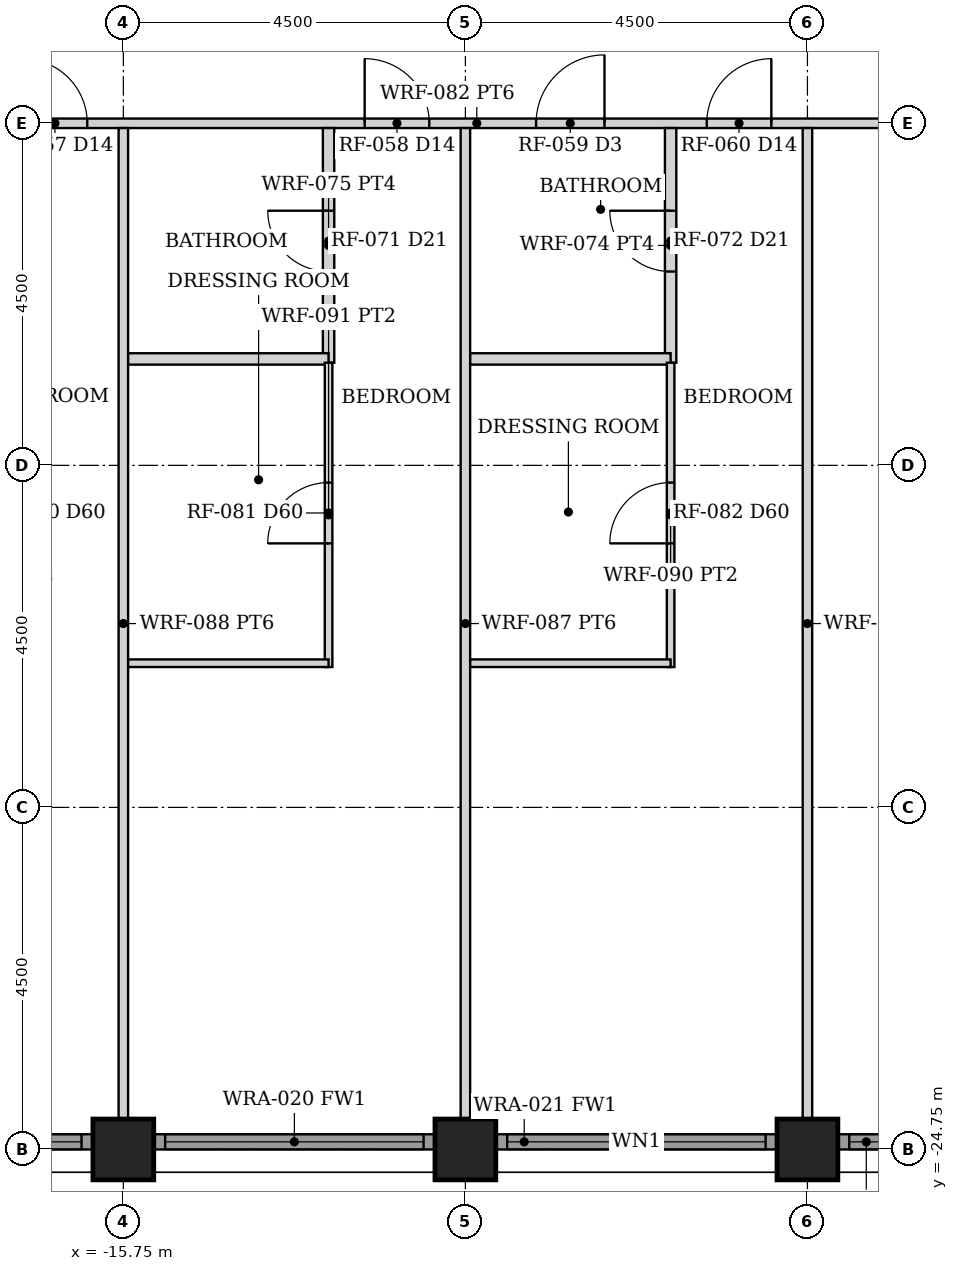
"""IFC4 building model, lengths in metres.
Left out: names, types, materials, properties, quantities, classifications, styles, units other than length and angle.
Written with IfcOpenShell. Run it as: python <this file> out.ifc"""

import sys

from ifc_helpers import new_model, si_unit, direction, frame, frame_2d, origin, origin_2d, place, context, subcontext, project, spatial, rectangle, hollow_rectangle, extrude, element, fill, save


model = new_model("IFC4")
c1 = context("Model", 3, precision=1e-05, world=origin(), true_north=direction((0.0, 1.0)))
c2 = subcontext(c1, "Body", "Model", "MODEL_VIEW")
j1 = project(units=[si_unit("LENGTHUNIT", "METRE"), si_unit("PLANEANGLEUNIT", "RADIAN")], contexts=[c1])
p1 = place(None, origin())
s1 = spatial("IfcSite", under=j1, at=p1, CompositionType="ELEMENT")
p2 = place(p1, origin())
s2 = spatial("IfcBuilding", under=s1, at=p2, CompositionType="ELEMENT")
p3 = place(p2, frame((0.0, 0.0, 79.0)))
s3 = spatial("IfcBuildingStorey", under=s2, at=p3, CompositionType="ELEMENT", Elevation=79.0)
for number, where, z_axis, x_axis in (
    (1, (-15.75, -24.75, 0.0), (0.0, 0.0, 1.0), (0.0, 1.0, 0.0)),
    (2, (-11.25, -24.75, 0.0), (0.0, 0.0, 1.0), (0.0, 1.0, 0.0)),
    (3, (-6.75, -24.75, 0.0), (0.0, 0.0, 1.0), (0.0, 1.0, 0.0)),
):
    element("IfcColumn", number, at=place(p3, frame(where, z_axis=z_axis, x_axis=x_axis)), inside=s3, PredefinedType="COLUMN", context=c2, shape_type="SweptSolid", body=[
        extrude(hollow_rectangle(XDim=0.8, YDim=0.8, WallThickness=0.06, at=origin_2d()), origin(), (0.0, 0.0, 1.0), 3.5),
    ])
p4 = place(p3, frame((-19.845, -24.65, 0.0), z_axis=(0.0, 0.0, 1.0), x_axis=(1.0, 0.0, 0.0)))
e4 = element("IfcWall", 4, at=p4, inside=s3, PredefinedType="SOLIDWALL", context=c2, shape_type="SweptSolid", body=[
    extrude(rectangle(XDim=3.69, YDim=0.2, at=frame_2d((1.845, 0.0))), origin(), (0.0, 0.0, 1.0), 2.379),
])
p5 = place(p4, frame((0.145, 0.0, 0.3)))
e5 = element("IfcOpeningElement", 5, at=p5, cuts=e4, PredefinedType="OPENING", context=c2, shape_type="SweptSolid", body=[
    extrude(rectangle(XDim=3.4, YDim=1.929, at=frame_2d((1.7, 0.964))), frame((0.0, 0.11, 0.0), z_axis=(0.0, -1.0, 0.0), x_axis=(1.0, 0.0, 0.0)), (0.0, 0.0, 1.0), 0.22),
])
p6 = place(p3, frame((-15.345, -24.65, 0.0), z_axis=(0.0, 0.0, 1.0), x_axis=(1.0, 0.0, 0.0)))
e6 = element("IfcWall", 6, at=p6, inside=s3, PredefinedType="SOLIDWALL", context=c2, shape_type="SweptSolid", body=[
    extrude(rectangle(XDim=3.69, YDim=0.2, at=frame_2d((1.845, 0.0))), origin(), (0.0, 0.0, 1.0), 2.379),
])
p7 = place(p6, frame((0.145, 0.0, 0.3)))
e7 = element("IfcOpeningElement", 7, at=p7, cuts=e6, PredefinedType="OPENING", context=c2, shape_type="SweptSolid", body=[
    extrude(rectangle(XDim=3.4, YDim=1.929, at=frame_2d((1.7, 0.964))), frame((0.0, 0.11, 0.0), z_axis=(0.0, -1.0, 0.0), x_axis=(1.0, 0.0, 0.0)), (0.0, 0.0, 1.0), 0.22),
])
p8 = place(p3, frame((-10.845, -24.65, 0.0), z_axis=(0.0, 0.0, 1.0), x_axis=(1.0, 0.0, 0.0)))
e8 = element("IfcWall", 8, at=p8, inside=s3, PredefinedType="SOLIDWALL", context=c2, shape_type="SweptSolid", body=[
    extrude(rectangle(XDim=3.69, YDim=0.2, at=frame_2d((1.845, 0.0))), origin(), (0.0, 0.0, 1.0), 2.379),
])
p9 = place(p8, frame((0.145, 0.0, 0.3)))
e9 = element("IfcOpeningElement", 9, at=p9, cuts=e8, PredefinedType="OPENING", context=c2, shape_type="SweptSolid", body=[
    extrude(rectangle(XDim=3.4, YDim=1.929, at=frame_2d((1.7, 0.964))), frame((0.0, 0.11, 0.0), z_axis=(0.0, -1.0, 0.0), x_axis=(1.0, 0.0, 0.0)), (0.0, 0.0, 1.0), 0.22),
])
p10 = place(p3, frame((-6.345, -24.65, 0.0), z_axis=(0.0, 0.0, 1.0), x_axis=(1.0, 0.0, 0.0)))
e10 = element("IfcWall", 10, at=p10, inside=s3, PredefinedType="SOLIDWALL", context=c2, shape_type="SweptSolid", body=[
    extrude(rectangle(XDim=3.69, YDim=0.2, at=frame_2d((1.845, 0.0))), origin(), (0.0, 0.0, 1.0), 2.379),
])
p11 = place(p10, frame((0.145, 0.0, 0.3)))
e11 = element("IfcOpeningElement", 11, at=p11, cuts=e10, PredefinedType="OPENING", context=c2, shape_type="SweptSolid", body=[
    extrude(rectangle(XDim=3.4, YDim=1.929, at=frame_2d((1.7, 0.964))), frame((0.0, 0.11, 0.0), z_axis=(0.0, -1.0, 0.0), x_axis=(1.0, 0.0, 0.0)), (0.0, 0.0, 1.0), 0.22),
])
p12 = place(p3, frame((-24.35, -11.25, 0.0), z_axis=(0.0, 0.0, 1.0), x_axis=(1.0, 0.0, 0.0)))
e12 = element("IfcWall", 12, at=p12, inside=s3, PredefinedType="PARTITIONING", context=c2, shape_type="SweptSolid", body=[
    extrude(rectangle(XDim=26.5, YDim=0.125, at=frame_2d((13.25, 0.0))), origin(), (0.0, 0.0, 1.0), 2.373),
])
p13 = place(p12, frame((24.75, 0.0, 0.0)))
e13 = element("IfcOpeningElement", 13, at=p13, cuts=e12, PredefinedType="OPENING", context=c2, shape_type="SweptSolid", body=[
    extrude(rectangle(XDim=0.9, YDim=2.1, at=frame_2d((0.45, 1.05))), frame((0.0, 0.073, 0.0), z_axis=(0.0, -1.0, 0.0), x_axis=(1.0, 0.0, 0.0)), (0.0, 0.0, 1.0), 0.145),
])
p14 = place(p12, frame((19.15, 0.0, 0.0)))
e14 = element("IfcOpeningElement", 14, at=p14, cuts=e12, PredefinedType="OPENING", context=c2, shape_type="SweptSolid", body=[
    extrude(rectangle(XDim=1.4, YDim=2.1, at=frame_2d((0.7, 1.05))), frame((0.0, 0.073, 0.0), z_axis=(0.0, -1.0, 0.0), x_axis=(1.0, 0.0, 0.0)), (0.0, 0.0, 1.0), 0.145),
])
p15 = place(p12, frame((16.275, 0.0, 0.0)))
e15 = element("IfcOpeningElement", 15, at=p15, cuts=e12, PredefinedType="OPENING", context=c2, shape_type="SweptSolid", body=[
    extrude(rectangle(XDim=0.85, YDim=2.1, at=frame_2d((0.425, 1.05))), frame((0.0, 0.073, 0.0), z_axis=(0.0, -1.0, 0.0), x_axis=(1.0, 0.0, 0.0)), (0.0, 0.0, 1.0), 0.145),
])
p16 = place(p12, frame((14.03, 0.0, 0.0)))
e16 = element("IfcOpeningElement", 16, at=p16, cuts=e12, PredefinedType="OPENING", context=c2, shape_type="SweptSolid", body=[
    extrude(rectangle(XDim=0.9, YDim=2.1, at=frame_2d((0.45, 1.05))), frame((0.0, 0.073, 0.0), z_axis=(0.0, -1.0, 0.0), x_axis=(1.0, 0.0, 0.0)), (0.0, 0.0, 1.0), 0.145),
])
p17 = place(p12, frame((11.775, 0.0, 0.0)))
e17 = element("IfcOpeningElement", 17, at=p17, cuts=e12, PredefinedType="OPENING", context=c2, shape_type="SweptSolid", body=[
    extrude(rectangle(XDim=0.85, YDim=2.1, at=frame_2d((0.425, 1.05))), frame((0.0, 0.073, 0.0), z_axis=(0.0, -1.0, 0.0), x_axis=(1.0, 0.0, 0.0)), (0.0, 0.0, 1.0), 0.145),
])
p18 = place(p12, frame((7.275, 0.0, 0.0)))
e18 = element("IfcOpeningElement", 18, at=p18, cuts=e12, PredefinedType="OPENING", context=c2, shape_type="SweptSolid", body=[
    extrude(rectangle(XDim=0.85, YDim=2.1, at=frame_2d((0.425, 1.05))), frame((0.0, 0.073, 0.0), z_axis=(0.0, -1.0, 0.0), x_axis=(1.0, 0.0, 0.0)), (0.0, 0.0, 1.0), 0.145),
])
p19 = place(p12, frame((2.775, 0.0, 0.0)))
e19 = element("IfcOpeningElement", 19, at=p19, cuts=e12, PredefinedType="OPENING", context=c2, shape_type="SweptSolid", body=[
    extrude(rectangle(XDim=0.85, YDim=2.1, at=frame_2d((0.425, 1.05))), frame((0.0, 0.073, 0.0), z_axis=(0.0, -1.0, 0.0), x_axis=(1.0, 0.0, 0.0)), (0.0, 0.0, 1.0), 0.145),
])
p20 = place(p3, frame((-6.75, -24.35, 0.0), z_axis=(0.0, 0.0, 1.0), x_axis=(0.0, 1.0, 0.0)))
e20 = element("IfcWall", 20, at=p20, inside=s3, PredefinedType="PARTITIONING", context=c2, shape_type="SweptSolid", body=[
    extrude(rectangle(XDim=13.038, YDim=0.125, at=frame_2d((6.519, 0.0))), origin(), (0.0, 0.0, 1.0), 2.373),
])
p21 = place(p3, frame((-8.55, -14.4, 0.0), z_axis=(0.0, 0.0, 1.0), x_axis=(0.0, 1.0, 0.0)))
e21 = element("IfcWall", 21, at=p21, inside=s3, PredefinedType="PARTITIONING", context=c2, shape_type="SweptSolid", body=[
    extrude(rectangle(XDim=3.087, YDim=0.15, at=frame_2d((1.544, 0.0))), origin(), (0.0, 0.0, 1.0), 2.373),
])
p22 = place(p21, frame((1.2, 0.0, 0.0)))
e22 = element("IfcOpeningElement", 22, at=p22, cuts=e21, PredefinedType="OPENING", context=c2, shape_type="SweptSolid", body=[
    extrude(rectangle(XDim=0.8, YDim=2.1, at=frame_2d((0.4, 1.05))), frame((0.0, 0.085, 0.0), z_axis=(0.0, -1.0, 0.0), x_axis=(1.0, 0.0, 0.0)), (0.0, 0.0, 1.0), 0.17),
])
p23 = place(p3, frame((-11.19, -14.35, 0.0), z_axis=(0.0, 0.0, 1.0), x_axis=(1.0, 0.0, 0.0)))
e23 = element("IfcWall", 23, at=p23, inside=s3, PredefinedType="PARTITIONING", context=c2, shape_type="SweptSolid", body=[
    extrude(rectangle(XDim=2.64, YDim=0.15, at=frame_2d((1.32, 0.0))), origin(), (0.0, 0.0, 1.0), 2.373),
])
p24 = place(p3, frame((-8.55, -18.403, 0.0), z_axis=(0.0, 0.0, 1.0), x_axis=(0.0, 1.0, 0.0)))
e24 = element("IfcWall", 24, at=p24, inside=s3, PredefinedType="PARTITIONING", context=c2, shape_type="SweptSolid", body=[
    extrude(rectangle(XDim=4.003, YDim=0.1, at=frame_2d((2.001, 0.0))), origin(), (0.0, 0.0, 1.0), 2.373),
])
p25 = place(p24, frame((1.627, 0.0, 0.0)))
e25 = element("IfcOpeningElement", 25, at=p25, cuts=e24, PredefinedType="OPENING", context=c2, shape_type="SweptSolid", body=[
    extrude(rectangle(XDim=0.8, YDim=2.1, at=frame_2d((0.4, 1.05))), frame((0.0, 0.06, 0.0), z_axis=(0.0, -1.0, 0.0), x_axis=(1.0, 0.0, 0.0)), (0.0, 0.0, 1.0), 0.12),
])
p26 = place(p3, frame((-11.19, -18.353, 0.0), z_axis=(0.0, 0.0, 1.0), x_axis=(1.0, 0.0, 0.0)))
e26 = element("IfcWall", 26, at=p26, inside=s3, PredefinedType="PARTITIONING", context=c2, shape_type="SweptSolid", body=[
    extrude(rectangle(XDim=2.64, YDim=0.1, at=frame_2d((1.32, 0.0))), origin(), (0.0, 0.0, 1.0), 2.373),
])
p27 = place(p3, frame((-11.25, -24.35, 0.0), z_axis=(0.0, 0.0, 1.0), x_axis=(0.0, 1.0, 0.0)))
e27 = element("IfcWall", 27, at=p27, inside=s3, PredefinedType="PARTITIONING", context=c2, shape_type="SweptSolid", body=[
    extrude(rectangle(XDim=13.038, YDim=0.125, at=frame_2d((6.519, 0.0))), origin(), (0.0, 0.0, 1.0), 2.373),
])
p28 = place(p3, frame((-13.05, -14.4, 0.0), z_axis=(0.0, 0.0, 1.0), x_axis=(0.0, 1.0, 0.0)))
e28 = element("IfcWall", 28, at=p28, inside=s3, PredefinedType="PARTITIONING", context=c2, shape_type="SweptSolid", body=[
    extrude(rectangle(XDim=3.087, YDim=0.15, at=frame_2d((1.544, 0.0))), origin(), (0.0, 0.0, 1.0), 2.373),
])
p29 = place(p28, frame((1.2, 0.0, 0.0)))
e29 = element("IfcOpeningElement", 29, at=p29, cuts=e28, PredefinedType="OPENING", context=c2, shape_type="SweptSolid", body=[
    extrude(rectangle(XDim=0.8, YDim=2.1, at=frame_2d((0.4, 1.05))), frame((0.0, 0.085, 0.0), z_axis=(0.0, -1.0, 0.0), x_axis=(1.0, 0.0, 0.0)), (0.0, 0.0, 1.0), 0.17),
])
p30 = place(p3, frame((-15.69, -14.35, 0.0), z_axis=(0.0, 0.0, 1.0), x_axis=(1.0, 0.0, 0.0)))
e30 = element("IfcWall", 30, at=p30, inside=s3, PredefinedType="PARTITIONING", context=c2, shape_type="SweptSolid", body=[
    extrude(rectangle(XDim=2.64, YDim=0.15, at=frame_2d((1.32, 0.0))), origin(), (0.0, 0.0, 1.0), 2.373),
])
p31 = place(p3, frame((-13.05, -18.403, 0.0), z_axis=(0.0, 0.0, 1.0), x_axis=(0.0, 1.0, 0.0)))
e31 = element("IfcWall", 31, at=p31, inside=s3, PredefinedType="PARTITIONING", context=c2, shape_type="SweptSolid", body=[
    extrude(rectangle(XDim=4.003, YDim=0.1, at=frame_2d((2.001, 0.0))), origin(), (0.0, 0.0, 1.0), 2.373),
])
p32 = place(p31, frame((1.627, 0.0, 0.0)))
e32 = element("IfcOpeningElement", 32, at=p32, cuts=e31, PredefinedType="OPENING", context=c2, shape_type="SweptSolid", body=[
    extrude(rectangle(XDim=0.8, YDim=2.1, at=frame_2d((0.4, 1.05))), frame((0.0, 0.06, 0.0), z_axis=(0.0, -1.0, 0.0), x_axis=(1.0, 0.0, 0.0)), (0.0, 0.0, 1.0), 0.12),
])
p33 = place(p3, frame((-15.69, -18.353, 0.0), z_axis=(0.0, 0.0, 1.0), x_axis=(1.0, 0.0, 0.0)))
e33 = element("IfcWall", 33, at=p33, inside=s3, PredefinedType="PARTITIONING", context=c2, shape_type="SweptSolid", body=[
    extrude(rectangle(XDim=2.64, YDim=0.1, at=frame_2d((1.32, 0.0))), origin(), (0.0, 0.0, 1.0), 2.373),
])
p34 = place(p3, frame((-15.75, -24.35, 0.0), z_axis=(0.0, 0.0, 1.0), x_axis=(0.0, 1.0, 0.0)))
e34 = element("IfcWall", 34, at=p34, inside=s3, PredefinedType="PARTITIONING", context=c2, shape_type="SweptSolid", body=[
    extrude(rectangle(XDim=13.038, YDim=0.125, at=frame_2d((6.519, 0.0))), origin(), (0.0, 0.0, 1.0), 2.373),
])
p35 = place(p5, origin())
e35 = element("IfcWindow", 35, at=p35, inside=s3, PartitioningType="SINGLE_PANEL", PredefinedType="WINDOW", context=c2, shape_type="SweptSolid", body=[
    extrude(rectangle(XDim=3.4, YDim=1.929, at=frame_2d((1.7, 0.964))), frame((0.0, 0.03, 0.0), z_axis=(0.0, -1.0, 0.0), x_axis=(1.0, 0.0, 0.0)), (0.0, 0.0, 1.0), 0.06),
])
fill(e5, e35)
p36 = place(p7, origin())
e36 = element("IfcWindow", 36, at=p36, inside=s3, PartitioningType="SINGLE_PANEL", PredefinedType="WINDOW", context=c2, shape_type="SweptSolid", body=[
    extrude(rectangle(XDim=3.4, YDim=1.929, at=frame_2d((1.7, 0.964))), frame((0.0, 0.03, 0.0), z_axis=(0.0, -1.0, 0.0), x_axis=(1.0, 0.0, 0.0)), (0.0, 0.0, 1.0), 0.06),
])
fill(e7, e36)
p37 = place(p9, origin())
e37 = element("IfcWindow", 37, at=p37, inside=s3, PartitioningType="SINGLE_PANEL", PredefinedType="WINDOW", context=c2, shape_type="SweptSolid", body=[
    extrude(rectangle(XDim=3.4, YDim=1.929, at=frame_2d((1.7, 0.964))), frame((0.0, 0.03, 0.0), z_axis=(0.0, -1.0, 0.0), x_axis=(1.0, 0.0, 0.0)), (0.0, 0.0, 1.0), 0.06),
])
fill(e9, e37)
p38 = place(p11, origin())
e38 = element("IfcWindow", 38, at=p38, inside=s3, PartitioningType="SINGLE_PANEL", PredefinedType="WINDOW", context=c2, shape_type="SweptSolid", body=[
    extrude(rectangle(XDim=3.4, YDim=1.929, at=frame_2d((1.7, 0.964))), frame((0.0, 0.03, 0.0), z_axis=(0.0, -1.0, 0.0), x_axis=(1.0, 0.0, 0.0)), (0.0, 0.0, 1.0), 0.06),
])
fill(e11, e38)
p39 = place(p15, origin())
e39 = element("IfcDoor", 39, at=p39, inside=s3, OperationType="SINGLE_SWING_RIGHT", PredefinedType="DOOR", context=c2, shape_type="SweptSolid", body=[
    extrude(rectangle(XDim=0.85, YDim=2.1, at=frame_2d((0.425, 1.05))), frame((0.0, 0.025, 0.0), z_axis=(0.0, -1.0, 0.0), x_axis=(1.0, 0.0, 0.0)), (0.0, 0.0, 1.0), 0.05),
])
fill(e15, e39)
p40 = place(p22, origin())
e40 = element("IfcDoor", 40, at=p40, inside=s3, OperationType="SINGLE_SWING_RIGHT", PredefinedType="DOOR", context=c2, shape_type="SweptSolid", body=[
    extrude(rectangle(XDim=0.8, YDim=2.1, at=frame_2d((0.4, 1.05))), frame((0.0, 0.025, 0.0), z_axis=(0.0, -1.0, 0.0), x_axis=(1.0, 0.0, 0.0)), (0.0, 0.0, 1.0), 0.05),
])
fill(e22, e40)
p41 = place(p16, origin())
e41 = element("IfcDoor", 41, at=p41, inside=s3, OperationType="SINGLE_SWING_RIGHT", PredefinedType="DOOR", context=c2, shape_type="SweptSolid", body=[
    extrude(rectangle(XDim=0.9, YDim=2.1, at=frame_2d((0.45, 1.05))), frame((0.0, 0.025, 0.0), z_axis=(0.0, -1.0, 0.0), x_axis=(1.0, 0.0, 0.0)), (0.0, 0.0, 1.0), 0.05),
])
fill(e16, e41)
p42 = place(p25, origin())
e42 = element("IfcDoor", 42, at=p42, inside=s3, OperationType="SINGLE_SWING_LEFT", PredefinedType="DOOR", context=c2, shape_type="SweptSolid", body=[
    extrude(rectangle(XDim=0.8, YDim=2.1, at=frame_2d((0.4, 1.05))), frame((0.0, 0.025, 0.0), z_axis=(0.0, -1.0, 0.0), x_axis=(1.0, 0.0, 0.0)), (0.0, 0.0, 1.0), 0.05),
])
fill(e25, e42)
p43 = place(p17, origin())
e43 = element("IfcDoor", 43, at=p43, inside=s3, OperationType="SINGLE_SWING_LEFT", PredefinedType="DOOR", context=c2, shape_type="SweptSolid", body=[
    extrude(rectangle(XDim=0.85, YDim=2.1, at=frame_2d((0.425, 1.05))), frame((0.0, 0.025, 0.0), z_axis=(0.0, -1.0, 0.0), x_axis=(1.0, 0.0, 0.0)), (0.0, 0.0, 1.0), 0.05),
])
fill(e17, e43)
p44 = place(p29, origin())
e44 = element("IfcDoor", 44, at=p44, inside=s3, OperationType="SINGLE_SWING_RIGHT", PredefinedType="DOOR", context=c2, shape_type="SweptSolid", body=[
    extrude(rectangle(XDim=0.8, YDim=2.1, at=frame_2d((0.4, 1.05))), frame((0.0, 0.025, 0.0), z_axis=(0.0, -1.0, 0.0), x_axis=(1.0, 0.0, 0.0)), (0.0, 0.0, 1.0), 0.05),
])
fill(e29, e44)
p45 = place(p32, origin())
e45 = element("IfcDoor", 45, at=p45, inside=s3, OperationType="SINGLE_SWING_LEFT", PredefinedType="DOOR", context=c2, shape_type="SweptSolid", body=[
    extrude(rectangle(XDim=0.8, YDim=2.1, at=frame_2d((0.4, 1.05))), frame((0.0, 0.025, 0.0), z_axis=(0.0, -1.0, 0.0), x_axis=(1.0, 0.0, 0.0)), (0.0, 0.0, 1.0), 0.05),
])
fill(e32, e45)
p46 = place(p18, origin())
e46 = element("IfcDoor", 46, at=p46, inside=s3, OperationType="SINGLE_SWING_LEFT", PredefinedType="DOOR", context=c2, shape_type="SweptSolid", body=[
    extrude(rectangle(XDim=0.85, YDim=2.1, at=frame_2d((0.425, 1.05))), frame((0.0, 0.025, 0.0), z_axis=(0.0, -1.0, 0.0), x_axis=(1.0, 0.0, 0.0)), (0.0, 0.0, 1.0), 0.05),
])
fill(e18, e46)
save(model, sys.argv[1])
